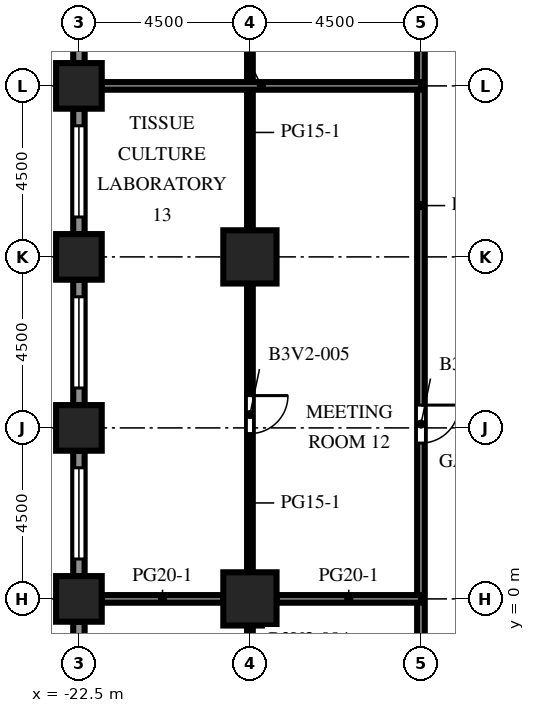
"""IFC4 building model, lengths in metres.
Left out: names, types, materials, properties, quantities, classifications, styles, units other than length and angle.
Written with IfcOpenShell. Run it as: python <this file> out.ifc"""

import sys

from ifc_helpers import new_model, si_unit, direction, frame, frame_2d, origin, origin_2d, place, context, subcontext, project, spatial, rectangle, extrude, element, fill, save


model = new_model("IFC4")
c1 = context("Model", 3, precision=1e-05, world=origin(), true_north=direction((0.0, 1.0)))
c2 = subcontext(c1, "Body", "Model", "MODEL_VIEW")
j1 = project(units=[si_unit("LENGTHUNIT", "METRE"), si_unit("PLANEANGLEUNIT", "RADIAN")], contexts=[c1])
p1 = place(None, origin())
s1 = spatial("IfcSite", under=j1, at=p1, CompositionType="ELEMENT")
p2 = place(p1, origin())
s2 = spatial("IfcBuilding", under=s1, at=p2, CompositionType="ELEMENT")
p3 = place(p2, frame((0.0, 0.0, 98.4)))
s3 = spatial("IfcBuildingStorey", under=s2, at=p3, CompositionType="ELEMENT", Elevation=98.4)
for number, where, z_axis, x_axis in (
    (1, (-22.5, 0.0, 0.0), (0.0, 0.0, 1.0), (1.0, 0.0, 0.0)),
    (2, (-22.5, 4.5, 0.0), (0.0, 0.0, 1.0), (1.0, 0.0, 0.0)),
    (3, (-22.5, 9.0, 0.0), (0.0, 0.0, 1.0), (1.0, 0.0, 0.0)),
    (4, (-22.5, 13.5, 0.0), (0.0, 0.0, 1.0), (1.0, 0.0, 0.0)),
):
    element("IfcColumn", number, at=place(p3, frame(where, z_axis=z_axis, x_axis=x_axis)), inside=s3, PredefinedType="COLUMN", context=c2, shape_type="SweptSolid", body=[
        extrude(rectangle(XDim=1.2, YDim=1.2, at=origin_2d()), origin(), (0.0, 0.0, 1.0), 4.1),
    ])
for number, where, z_axis, x_axis in (
    (5, (-18.0, 0.0, 0.0), (0.0, 0.0, 1.0), (1.0, 0.0, 0.0)),
    (6, (-18.0, 9.0, 0.0), (0.0, 0.0, 1.0), (1.0, 0.0, 0.0)),
):
    element("IfcColumn", number, at=place(p3, frame(where, z_axis=z_axis, x_axis=x_axis)), inside=s3, PredefinedType="COLUMN", context=c2, shape_type="SweptSolid", body=[
        extrude(rectangle(XDim=1.4, YDim=1.4, at=origin_2d()), origin(), (0.0, 0.0, 1.0), 4.1),
    ])
p4 = place(p3, frame((-22.5, 14.1, 0.0), z_axis=(0.0, 0.0, 1.0), x_axis=(0.0, 1.0, 0.0)))
e7 = element("IfcWall", 7, at=p4, inside=s3, PredefinedType="SOLIDWALL", context=c2, shape_type="SweptSolid", body=[
    extrude(rectangle(XDim=3.3, YDim=0.3, at=frame_2d((1.65, 0.0))), origin(), (0.0, 0.0, 1.0), 2.75),
])
p5 = place(p4, frame((0.45, 0.0, 0.8)))
e8 = element("IfcOpeningElement", 8, at=p5, cuts=e7, PredefinedType="OPENING", context=c2, shape_type="SweptSolid", body=[
    extrude(rectangle(XDim=2.4, YDim=1.7, at=frame_2d((1.2, 0.85))), frame((0.0, 0.16, 0.0), z_axis=(0.0, -1.0, 0.0), x_axis=(1.0, 0.0, 0.0)), (0.0, 0.0, 1.0), 0.32),
])
p6 = place(p3, frame((-22.5, 9.6, 0.0), z_axis=(0.0, 0.0, 1.0), x_axis=(0.0, 1.0, 0.0)))
e9 = element("IfcWall", 9, at=p6, inside=s3, PredefinedType="SOLIDWALL", context=c2, shape_type="SweptSolid", body=[
    extrude(rectangle(XDim=3.3, YDim=0.3, at=frame_2d((1.65, 0.0))), origin(), (0.0, 0.0, 1.0), 2.75),
])
p7 = place(p6, frame((0.45, 0.0, 0.8)))
e10 = element("IfcOpeningElement", 10, at=p7, cuts=e9, PredefinedType="OPENING", context=c2, shape_type="SweptSolid", body=[
    extrude(rectangle(XDim=2.4, YDim=1.7, at=frame_2d((1.2, 0.85))), frame((0.0, 0.16, 0.0), z_axis=(0.0, -1.0, 0.0), x_axis=(1.0, 0.0, 0.0)), (0.0, 0.0, 1.0), 0.32),
])
p8 = place(p3, frame((-22.5, 5.1, 0.0), z_axis=(0.0, 0.0, 1.0), x_axis=(0.0, 1.0, 0.0)))
e11 = element("IfcWall", 11, at=p8, inside=s3, PredefinedType="SOLIDWALL", context=c2, shape_type="SweptSolid", body=[
    extrude(rectangle(XDim=3.3, YDim=0.3, at=frame_2d((1.65, 0.0))), origin(), (0.0, 0.0, 1.0), 2.75),
])
p9 = place(p8, frame((0.45, 0.0, 0.8)))
e12 = element("IfcOpeningElement", 12, at=p9, cuts=e11, PredefinedType="OPENING", context=c2, shape_type="SweptSolid", body=[
    extrude(rectangle(XDim=2.4, YDim=1.7, at=frame_2d((1.2, 0.85))), frame((0.0, 0.16, 0.0), z_axis=(0.0, -1.0, 0.0), x_axis=(1.0, 0.0, 0.0)), (0.0, 0.0, 1.0), 0.32),
])
p10 = place(p3, frame((-22.5, 0.6, 0.0), z_axis=(0.0, 0.0, 1.0), x_axis=(0.0, 1.0, 0.0)))
e13 = element("IfcWall", 13, at=p10, inside=s3, PredefinedType="SOLIDWALL", context=c2, shape_type="SweptSolid", body=[
    extrude(rectangle(XDim=3.3, YDim=0.3, at=frame_2d((1.65, 0.0))), origin(), (0.0, 0.0, 1.0), 2.75),
])
p11 = place(p10, frame((0.45, 0.0, 0.8)))
e14 = element("IfcOpeningElement", 14, at=p11, cuts=e13, PredefinedType="OPENING", context=c2, shape_type="SweptSolid", body=[
    extrude(rectangle(XDim=2.4, YDim=1.7, at=frame_2d((1.2, 0.85))), frame((0.0, 0.16, 0.0), z_axis=(0.0, -1.0, 0.0), x_axis=(1.0, 0.0, 0.0)), (0.0, 0.0, 1.0), 0.32),
])
p12 = place(p3, frame((-22.5, -3.9, 0.0), z_axis=(0.0, 0.0, 1.0), x_axis=(0.0, 1.0, 0.0)))
e15 = element("IfcWall", 15, at=p12, inside=s3, PredefinedType="SOLIDWALL", context=c2, shape_type="SweptSolid", body=[
    extrude(rectangle(XDim=3.3, YDim=0.3, at=frame_2d((1.65, 0.0))), origin(), (0.0, 0.0, 1.0), 2.75),
])
p13 = place(p12, frame((0.45, 0.0, 0.8)))
e16 = element("IfcOpeningElement", 16, at=p13, cuts=e15, PredefinedType="OPENING", context=c2, shape_type="SweptSolid", body=[
    extrude(rectangle(XDim=2.4, YDim=1.7, at=frame_2d((1.2, 0.85))), frame((0.0, 0.16, 0.0), z_axis=(0.0, -1.0, 0.0), x_axis=(1.0, 0.0, 0.0)), (0.0, 0.0, 1.0), 0.32),
])
p14 = place(p3, frame((-18.0, -8.3, 0.0), z_axis=(0.0, 0.0, 1.0), x_axis=(0.0, 1.0, 0.0)))
e17 = element("IfcWall", 17, at=p14, inside=s3, PredefinedType="PARTITIONING", context=c2, shape_type="SweptSolid", body=[
    extrude(rectangle(XDim=7.6, YDim=0.15, at=frame_2d((3.8, 0.0))), origin(), (0.0, 0.0, 1.0), 3.65),
])
p15 = place(p14, frame((0.15, 0.0, 0.0)))
e18 = element("IfcOpeningElement", 18, at=p15, cuts=e17, PredefinedType="OPENING", context=c2, shape_type="SweptSolid", body=[
    extrude(rectangle(XDim=1.0, YDim=2.1, at=frame_2d((0.5, 1.05))), frame((0.0, 0.085, 0.0), z_axis=(0.0, -1.0, 0.0), x_axis=(1.0, 0.0, 0.0)), (0.0, 0.0, 1.0), 0.17),
])
p16 = place(p14, frame((5.15, 0.0, 0.0)))
e19 = element("IfcOpeningElement", 19, at=p16, cuts=e17, PredefinedType="OPENING", context=c2, shape_type="SweptSolid", body=[
    extrude(rectangle(XDim=1.0, YDim=2.1, at=frame_2d((0.5, 1.05))), frame((0.0, 0.085, 0.0), z_axis=(0.0, -1.0, 0.0), x_axis=(1.0, 0.0, 0.0)), (0.0, 0.0, 1.0), 0.17),
])
p17 = place(p3, frame((-18.0, 0.7, 0.0), z_axis=(0.0, 0.0, 1.0), x_axis=(0.0, 1.0, 0.0)))
e20 = element("IfcWall", 20, at=p17, inside=s3, PredefinedType="PARTITIONING", context=c2, shape_type="SweptSolid", body=[
    extrude(rectangle(XDim=7.6, YDim=0.15, at=frame_2d((3.8, 0.0))), origin(), (0.0, 0.0, 1.0), 3.65),
])
p18 = place(p17, frame((3.65, 0.0, 0.0)))
e21 = element("IfcOpeningElement", 21, at=p18, cuts=e20, PredefinedType="OPENING", context=c2, shape_type="SweptSolid", body=[
    extrude(rectangle(XDim=1.0, YDim=2.1, at=frame_2d((0.5, 1.05))), frame((0.0, 0.085, 0.0), z_axis=(0.0, -1.0, 0.0), x_axis=(1.0, 0.0, 0.0)), (0.0, 0.0, 1.0), 0.17),
])
p19 = place(p3, frame((-18.0, 9.7, 0.0), z_axis=(0.0, 0.0, 1.0), x_axis=(0.0, 1.0, 0.0)))
e22 = element("IfcWall", 22, at=p19, inside=s3, PredefinedType="PARTITIONING", context=c2, shape_type="SweptSolid", body=[
    extrude(rectangle(XDim=7.6, YDim=0.15, at=frame_2d((3.8, 0.0))), origin(), (0.0, 0.0, 1.0), 3.65),
])
p20 = place(p19, frame((5.15, 0.0, 0.0)))
e23 = element("IfcOpeningElement", 23, at=p20, cuts=e22, PredefinedType="OPENING", context=c2, shape_type="SweptSolid", body=[
    extrude(rectangle(XDim=1.0, YDim=2.1, at=frame_2d((0.5, 1.05))), frame((0.0, 0.085, 0.0), z_axis=(0.0, -1.0, 0.0), x_axis=(1.0, 0.0, 0.0)), (0.0, 0.0, 1.0), 0.17),
])
p21 = place(p3, frame((-13.5, -21.9, 0.0), z_axis=(0.0, 0.0, 1.0), x_axis=(0.0, 1.0, 0.0)))
e24 = element("IfcWall", 24, at=p21, inside=s3, PredefinedType="PARTITIONING", context=c2, shape_type="SweptSolid", body=[
    extrude(rectangle(XDim=52.8, YDim=0.2, at=frame_2d((26.4, 0.0))), origin(), (0.0, 0.0, 1.0), 3.65),
])
p22 = place(p21, frame((0.75, 0.0, 0.0)))
e25 = element("IfcOpeningElement", 25, at=p22, cuts=e24, PredefinedType="OPENING", context=c2, shape_type="SweptSolid", body=[
    extrude(rectangle(XDim=1.0, YDim=2.1, at=frame_2d((0.5, 1.05))), frame((0.0, 0.11, 0.0), z_axis=(0.0, -1.0, 0.0), x_axis=(1.0, 0.0, 0.0)), (0.0, 0.0, 1.0), 0.22),
])
p23 = place(p21, frame((5.0, 0.0, 0.0)))
e26 = element("IfcOpeningElement", 26, at=p23, cuts=e24, PredefinedType="OPENING", context=c2, shape_type="SweptSolid", body=[
    extrude(rectangle(XDim=1.0, YDim=2.1, at=frame_2d((0.5, 1.05))), frame((0.0, 0.11, 0.0), z_axis=(0.0, -1.0, 0.0), x_axis=(1.0, 0.0, 0.0)), (0.0, 0.0, 1.0), 0.22),
])
p24 = place(p21, frame((12.5, 0.0, 0.0)))
e27 = element("IfcOpeningElement", 27, at=p24, cuts=e24, PredefinedType="OPENING", context=c2, shape_type="SweptSolid", body=[
    extrude(rectangle(XDim=1.0, YDim=2.1, at=frame_2d((0.5, 1.05))), frame((0.0, 0.11, 0.0), z_axis=(0.0, -1.0, 0.0), x_axis=(1.0, 0.0, 0.0)), (0.0, 0.0, 1.0), 0.22),
])
p25 = place(p21, frame((19.75, 0.0, 0.0)))
e28 = element("IfcOpeningElement", 28, at=p25, cuts=e24, PredefinedType="OPENING", context=c2, shape_type="SweptSolid", body=[
    extrude(rectangle(XDim=1.0, YDim=2.1, at=frame_2d((0.5, 1.05))), frame((0.0, 0.11, 0.0), z_axis=(0.0, -1.0, 0.0), x_axis=(1.0, 0.0, 0.0)), (0.0, 0.0, 1.0), 0.22),
])
p26 = place(p21, frame((26.0, 0.0, 0.0)))
e29 = element("IfcOpeningElement", 29, at=p26, cuts=e24, PredefinedType="OPENING", context=c2, shape_type="SweptSolid", body=[
    extrude(rectangle(XDim=1.0, YDim=2.1, at=frame_2d((0.5, 1.05))), frame((0.0, 0.11, 0.0), z_axis=(0.0, -1.0, 0.0), x_axis=(1.0, 0.0, 0.0)), (0.0, 0.0, 1.0), 0.22),
])
p27 = place(p21, frame((37.5, 0.0, 0.0)))
e30 = element("IfcOpeningElement", 30, at=p27, cuts=e24, PredefinedType="OPENING", context=c2, shape_type="SweptSolid", body=[
    extrude(rectangle(XDim=1.0, YDim=2.1, at=frame_2d((0.5, 1.05))), frame((0.0, 0.11, 0.0), z_axis=(0.0, -1.0, 0.0), x_axis=(1.0, 0.0, 0.0)), (0.0, 0.0, 1.0), 0.22),
])
p28 = place(p21, frame((43.25, 0.0, 0.0)))
e31 = element("IfcOpeningElement", 31, at=p28, cuts=e24, PredefinedType="OPENING", context=c2, shape_type="SweptSolid", body=[
    extrude(rectangle(XDim=1.0, YDim=2.1, at=frame_2d((0.5, 1.05))), frame((0.0, 0.11, 0.0), z_axis=(0.0, -1.0, 0.0), x_axis=(1.0, 0.0, 0.0)), (0.0, 0.0, 1.0), 0.22),
])
p29 = place(p21, frame((50.0, 0.0, 0.0)))
e32 = element("IfcOpeningElement", 32, at=p29, cuts=e24, PredefinedType="OPENING", context=c2, shape_type="SweptSolid", body=[
    extrude(rectangle(XDim=1.0, YDim=2.1, at=frame_2d((0.5, 1.05))), frame((0.0, 0.11, 0.0), z_axis=(0.0, -1.0, 0.0), x_axis=(1.0, 0.0, 0.0)), (0.0, 0.0, 1.0), 0.22),
])
p30 = place(p3, frame((-21.9, 0.0, 0.0), z_axis=(0.0, 0.0, 1.0), x_axis=(1.0, 0.0, 0.0)))
e33 = element("IfcWall", 33, at=p30, inside=s3, PredefinedType="PARTITIONING", context=c2, shape_type="SweptSolid", body=[
    extrude(rectangle(XDim=3.2, YDim=0.2, at=frame_2d((1.6, 0.0))), origin(), (0.0, 0.0, 1.0), 3.65),
])
p31 = place(p3, frame((-17.3, 0.0, 0.0), z_axis=(0.0, 0.0, 1.0), x_axis=(1.0, 0.0, 0.0)))
e34 = element("IfcWall", 34, at=p31, inside=s3, PredefinedType="PARTITIONING", context=c2, shape_type="SweptSolid", body=[
    extrude(rectangle(XDim=3.8, YDim=0.2, at=frame_2d((1.9, 0.0))), origin(), (0.0, 0.0, 1.0), 3.65),
])
p32 = place(p3, frame((-21.9, 13.5, 0.0), z_axis=(0.0, 0.0, 1.0), x_axis=(1.0, 0.0, 0.0)))
e35 = element("IfcWall", 35, at=p32, inside=s3, PredefinedType="PARTITIONING", context=c2, shape_type="SweptSolid", body=[
    extrude(rectangle(XDim=8.4, YDim=0.2, at=frame_2d((4.2, 0.0))), origin(), (0.0, 0.0, 1.0), 3.65),
])
p33 = place(p7, origin())
e36 = element("IfcWindow", 36, at=p33, inside=s3, PartitioningType="SINGLE_PANEL", PredefinedType="WINDOW", context=c2, shape_type="SweptSolid", body=[
    extrude(rectangle(XDim=2.4, YDim=1.7, at=frame_2d((1.2, 0.85))), frame((0.0, 0.03, 0.0), z_axis=(0.0, -1.0, 0.0), x_axis=(1.0, 0.0, 0.0)), (0.0, 0.0, 1.0), 0.06),
])
fill(e10, e36)
p34 = place(p9, origin())
e37 = element("IfcWindow", 37, at=p34, inside=s3, PartitioningType="SINGLE_PANEL", PredefinedType="WINDOW", context=c2, shape_type="SweptSolid", body=[
    extrude(rectangle(XDim=2.4, YDim=1.7, at=frame_2d((1.2, 0.85))), frame((0.0, 0.03, 0.0), z_axis=(0.0, -1.0, 0.0), x_axis=(1.0, 0.0, 0.0)), (0.0, 0.0, 1.0), 0.06),
])
fill(e12, e37)
p35 = place(p11, origin())
e38 = element("IfcWindow", 38, at=p35, inside=s3, PartitioningType="SINGLE_PANEL", PredefinedType="WINDOW", context=c2, shape_type="SweptSolid", body=[
    extrude(rectangle(XDim=2.4, YDim=1.7, at=frame_2d((1.2, 0.85))), frame((0.0, 0.03, 0.0), z_axis=(0.0, -1.0, 0.0), x_axis=(1.0, 0.0, 0.0)), (0.0, 0.0, 1.0), 0.06),
])
fill(e14, e38)
p36 = place(p18, origin())
e39 = element("IfcDoor", 39, at=p36, inside=s3, OperationType="SINGLE_SWING_RIGHT", PredefinedType="DOOR", context=c2, shape_type="SweptSolid", body=[
    extrude(rectangle(XDim=1.0, YDim=2.1, at=frame_2d((0.5, 1.05))), frame((0.0, 0.025, 0.0), z_axis=(0.0, -1.0, 0.0), x_axis=(1.0, 0.0, 0.0)), (0.0, 0.0, 1.0), 0.05),
])
fill(e21, e39)
p37 = place(p26, origin())
e40 = element("IfcDoor", 40, at=p37, inside=s3, OperationType="SINGLE_SWING_RIGHT", PredefinedType="DOOR", context=c2, shape_type="SweptSolid", body=[
    extrude(rectangle(XDim=1.0, YDim=2.1, at=frame_2d((0.5, 1.05))), frame((0.0, 0.025, 0.0), z_axis=(0.0, -1.0, 0.0), x_axis=(1.0, 0.0, 0.0)), (0.0, 0.0, 1.0), 0.05),
])
fill(e29, e40)
save(model, sys.argv[1])
